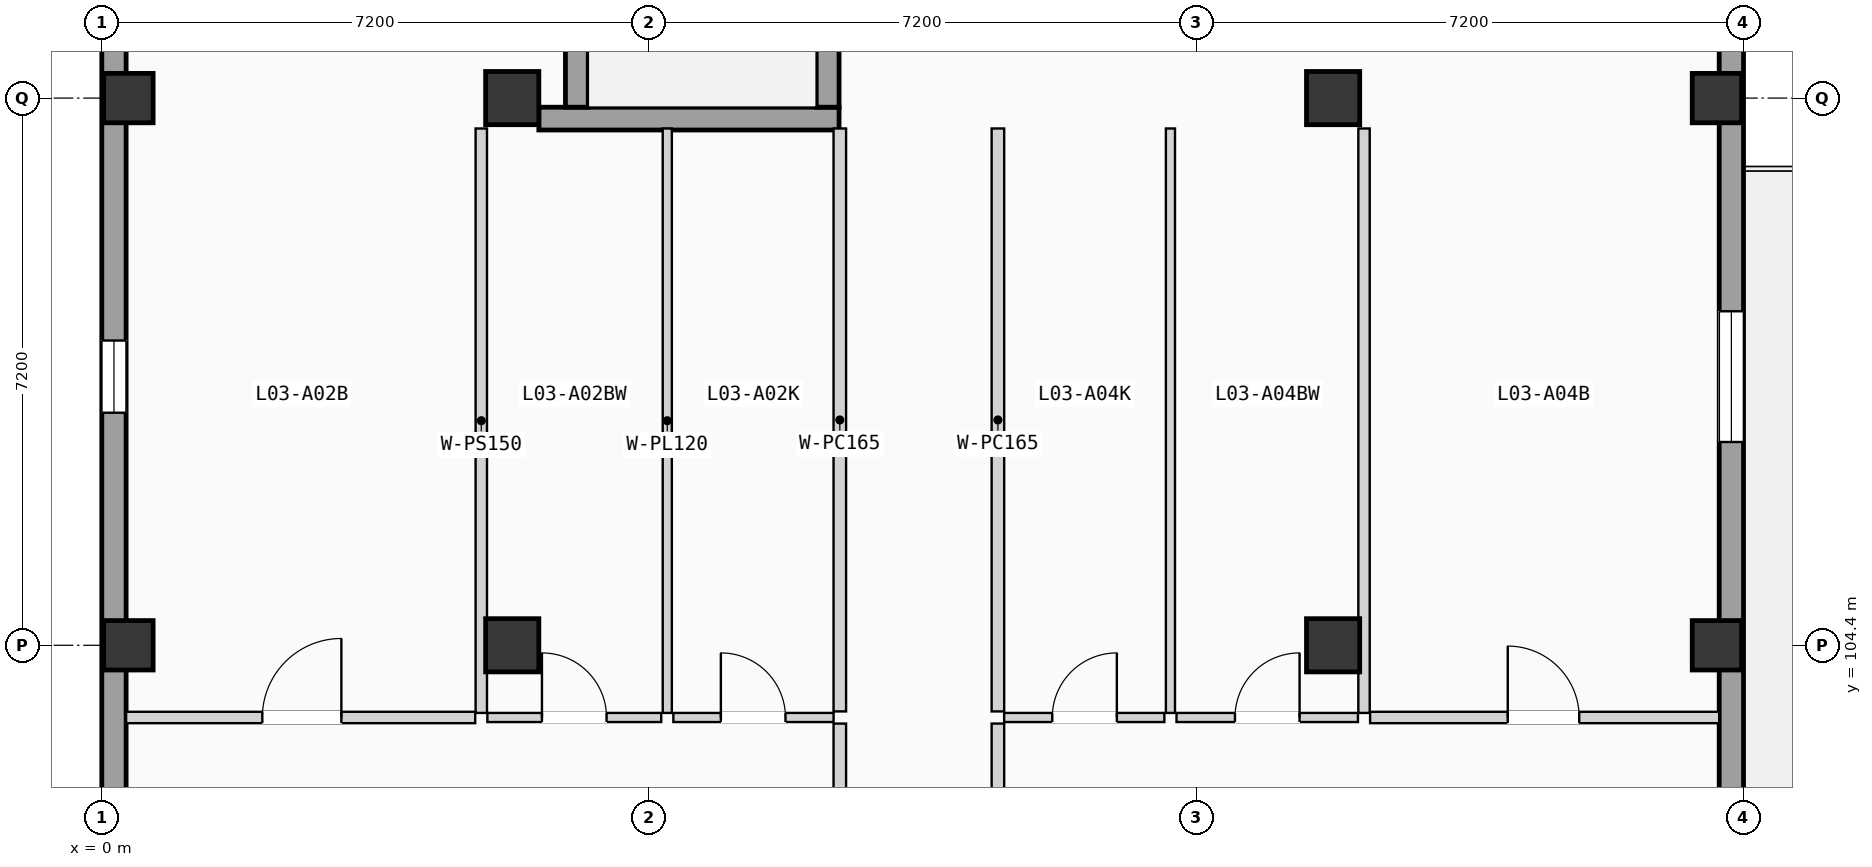
"""IFC4 building model, lengths in metres.
Left out: names, types, materials, properties, quantities, classifications, styles, units other than length and angle.
Written with IfcOpenShell. Run it as: python <this file> out.ifc"""

import sys

from ifc_helpers import new_model, si_unit, direction, frame, frame_2d, origin, origin_2d, place, context, subcontext, project, spatial, rectangle, extrude, element, fill, save


model = new_model("IFC4")
c1 = context("Model", 3, precision=1e-05, world=origin(), true_north=direction((0.0, 1.0)))
c2 = subcontext(c1, "Body", "Model", "MODEL_VIEW")
j1 = project(units=[si_unit("LENGTHUNIT", "METRE"), si_unit("PLANEANGLEUNIT", "RADIAN")], contexts=[c1])
p1 = place(None, origin())
s1 = spatial("IfcSite", under=j1, at=p1, CompositionType="ELEMENT")
p2 = place(p1, origin())
s2 = spatial("IfcBuilding", under=s1, at=p2, CompositionType="ELEMENT")
p3 = place(p2, frame((0.0, 0.0, 12.075)))
s3 = spatial("IfcBuildingStorey", under=s2, at=p3, CompositionType="ELEMENT", Elevation=12.075)
for number, where, z_axis, x_axis in (
    (1, (0.35, 104.4, 0.0), (0.0, 0.0, 1.0), (1.0, 0.0, 0.0)),
    (2, (0.35, 111.6, 0.0), (0.0, 0.0, 1.0), (1.0, 0.0, 0.0)),
):
    element("IfcColumn", number, at=place(p3, frame(where, z_axis=z_axis, x_axis=x_axis)), inside=s3, PredefinedType="COLUMN", context=c2, shape_type="SweptSolid", body=[
        extrude(rectangle(XDim=0.65, YDim=0.65, at=origin_2d()), origin(), (0.0, 0.0, 1.0), 3.15),
    ])
for number, where, z_axis, x_axis in (
    (3, (5.4, 104.4, 0.0), (0.0, 0.0, 1.0), (1.0, 0.0, 0.0)),
    (4, (5.4, 111.6, 0.0), (0.0, 0.0, 1.0), (1.0, 0.0, 0.0)),
    (5, (16.2, 104.4, 0.0), (0.0, 0.0, 1.0), (1.0, 0.0, 0.0)),
    (6, (16.2, 111.6, 0.0), (0.0, 0.0, 1.0), (1.0, 0.0, 0.0)),
):
    element("IfcColumn", number, at=place(p3, frame(where, z_axis=z_axis, x_axis=x_axis)), inside=s3, PredefinedType="COLUMN", context=c2, shape_type="SweptSolid", body=[
        extrude(rectangle(XDim=0.7, YDim=0.7, at=origin_2d()), origin(), (0.0, 0.0, 1.0), 3.15),
    ])
for number, where, z_axis, x_axis in (
    (7, (21.25, 104.4, 0.0), (0.0, 0.0, 1.0), (1.0, 0.0, 0.0)),
    (8, (21.25, 111.6, 0.0), (0.0, 0.0, 1.0), (1.0, 0.0, 0.0)),
):
    element("IfcColumn", number, at=place(p3, frame(where, z_axis=z_axis, x_axis=x_axis)), inside=s3, PredefinedType="COLUMN", context=c2, shape_type="SweptSolid", body=[
        extrude(rectangle(XDim=0.65, YDim=0.65, at=origin_2d()), origin(), (0.0, 0.0, 1.0), 3.15),
    ])
p4 = place(p3, frame((0.16, 68.72, 0.0), z_axis=(0.0, 0.0, 1.0), x_axis=(0.0, 1.0, 0.0)))
e9 = element("IfcWall", 9, at=p4, inside=s3, PredefinedType="SOLIDWALL", context=c2, shape_type="SweptSolid", body=[
    extrude(rectangle(XDim=49.76, YDim=0.32, at=frame_2d((24.88, 0.0))), origin(), (0.0, 0.0, 1.0), 2.89),
])
p5 = place(p4, frame((12.169, 0.0, 0.85)))
e10 = element("IfcOpeningElement", 10, at=p5, cuts=e9, PredefinedType="OPENING", context=c2, shape_type="SweptSolid", body=[
    extrude(rectangle(XDim=0.95, YDim=1.2, at=frame_2d((0.475, 0.6))), frame((0.0, 0.17, 0.0), z_axis=(0.0, -1.0, 0.0), x_axis=(1.0, 0.0, 0.0)), (0.0, 0.0, 1.0), 0.34),
])
p6 = place(p4, frame((8.499, 0.0, 0.9)))
e11 = element("IfcOpeningElement", 11, at=p6, cuts=e9, PredefinedType="OPENING", context=c2, shape_type="SweptSolid", body=[
    extrude(rectangle(XDim=1.6, YDim=1.2, at=frame_2d((0.8, 0.6))), frame((0.0, 0.17, 0.0), z_axis=(0.0, -1.0, 0.0), x_axis=(1.0, 0.0, 0.0)), (0.0, 0.0, 1.0), 0.34),
])
p7 = place(p4, frame((17.747, 0.0, 0.855)))
e12 = element("IfcOpeningElement", 12, at=p7, cuts=e9, PredefinedType="OPENING", context=c2, shape_type="SweptSolid", body=[
    extrude(rectangle(XDim=1.6, YDim=1.35, at=frame_2d((0.8, 0.675))), frame((0.0, 0.17, 0.0), z_axis=(0.0, -1.0, 0.0), x_axis=(1.0, 0.0, 0.0)), (0.0, 0.0, 1.0), 0.34),
])
p8 = place(p4, frame((30.9, 0.0, 0.705)))
e13 = element("IfcOpeningElement", 13, at=p8, cuts=e9, PredefinedType="OPENING", context=c2, shape_type="SweptSolid", body=[
    extrude(rectangle(XDim=1.6, YDim=1.5, at=frame_2d((0.8, 0.75))), frame((0.0, 0.17, 0.0), z_axis=(0.0, -1.0, 0.0), x_axis=(1.0, 0.0, 0.0)), (0.0, 0.0, 1.0), 0.34),
])
p9 = place(p4, frame((23.677, 0.0, 0.555)))
e14 = element("IfcOpeningElement", 14, at=p9, cuts=e9, PredefinedType="OPENING", context=c2, shape_type="SweptSolid", body=[
    extrude(rectangle(XDim=1.6, YDim=1.65, at=frame_2d((0.8, 0.825))), frame((0.0, 0.17, 0.0), z_axis=(0.0, -1.0, 0.0), x_axis=(1.0, 0.0, 0.0)), (0.0, 0.0, 1.0), 0.34),
])
p10 = place(p4, frame((38.74, 0.0, 0.85)))
e15 = element("IfcOpeningElement", 15, at=p10, cuts=e9, PredefinedType="OPENING", context=c2, shape_type="SweptSolid", body=[
    extrude(rectangle(XDim=0.95, YDim=1.2, at=frame_2d((0.475, 0.6))), frame((0.0, 0.17, 0.0), z_axis=(0.0, -1.0, 0.0), x_axis=(1.0, 0.0, 0.0)), (0.0, 0.0, 1.0), 0.34),
])
p11 = place(p3, frame((21.44, 68.72, 0.0), z_axis=(0.0, 0.0, 1.0), x_axis=(0.0, 1.0, 0.0)))
e16 = element("IfcWall", 16, at=p11, inside=s3, PredefinedType="SOLIDWALL", context=c2, shape_type="SweptSolid", body=[
    extrude(rectangle(XDim=49.76, YDim=0.32, at=frame_2d((24.88, 0.0))), origin(), (0.0, 0.0, 1.0), 2.89),
])
p12 = place(p11, frame((10.83, 0.0, 0.0)))
e17 = element("IfcOpeningElement", 17, at=p12, cuts=e16, PredefinedType="OPENING", context=c2, shape_type="SweptSolid", body=[
    extrude(rectangle(XDim=0.95, YDim=2.15, at=frame_2d((0.475, 1.075))), frame((0.0, 0.17, 0.0), z_axis=(0.0, -1.0, 0.0), x_axis=(1.0, 0.0, 0.0)), (0.0, 0.0, 1.0), 0.34),
])
p13 = place(p11, frame((16.598, 0.0, 0.9)))
e18 = element("IfcOpeningElement", 18, at=p13, cuts=e16, PredefinedType="OPENING", context=c2, shape_type="SweptSolid", body=[
    extrude(rectangle(XDim=1.72, YDim=1.2, at=frame_2d((0.86, 0.6))), frame((0.0, 0.17, 0.0), z_axis=(0.0, -1.0, 0.0), x_axis=(1.0, 0.0, 0.0)), (0.0, 0.0, 1.0), 0.34),
])
p14 = place(p11, frame((32.365, 0.0, 0.0)))
e19 = element("IfcOpeningElement", 19, at=p14, cuts=e16, PredefinedType="OPENING", context=c2, shape_type="SweptSolid", body=[
    extrude(rectangle(XDim=1.08, YDim=2.18, at=frame_2d((0.54, 1.09))), frame((0.0, 0.17, 0.0), z_axis=(0.0, -1.0, 0.0), x_axis=(1.0, 0.0, 0.0)), (0.0, 0.0, 1.0), 0.34),
])
p15 = place(p11, frame((23.617, 0.0, 0.855)))
e20 = element("IfcOpeningElement", 20, at=p15, cuts=e16, PredefinedType="OPENING", context=c2, shape_type="SweptSolid", body=[
    extrude(rectangle(XDim=1.72, YDim=1.35, at=frame_2d((0.86, 0.675))), frame((0.0, 0.17, 0.0), z_axis=(0.0, -1.0, 0.0), x_axis=(1.0, 0.0, 0.0)), (0.0, 0.0, 1.0), 0.34),
])
p16 = place(p11, frame((38.355, 0.0, 0.705)))
e21 = element("IfcOpeningElement", 21, at=p16, cuts=e16, PredefinedType="OPENING", context=c2, shape_type="SweptSolid", body=[
    extrude(rectangle(XDim=1.72, YDim=1.5, at=frame_2d((0.86, 0.75))), frame((0.0, 0.17, 0.0), z_axis=(0.0, -1.0, 0.0), x_axis=(1.0, 0.0, 0.0)), (0.0, 0.0, 1.0), 0.34),
])
p17 = place(p3, frame((5.75, 111.33, 0.0), z_axis=(0.0, 0.0, 1.0), x_axis=(1.0, 0.0, 0.0)))
e22 = element("IfcWall", 22, at=p17, inside=s3, PredefinedType="SHEAR", context=c2, shape_type="SweptSolid", body=[
    extrude(rectangle(XDim=3.95, YDim=0.3, at=frame_2d((1.975, 0.0))), origin(), (0.0, 0.0, 1.0), 2.89),
])
p18 = place(p3, frame((6.25, 111.48, 0.0), z_axis=(0.0, 0.0, 1.0), x_axis=(0.0, 1.0, 0.0)))
e23 = element("IfcWall", 23, at=p18, inside=s3, PredefinedType="SHEAR", context=c2, shape_type="SweptSolid", body=[
    extrude(rectangle(XDim=7.0, YDim=0.3, at=frame_2d((3.5, 0.0))), origin(), (0.0, 0.0, 1.0), 2.89),
])
p19 = place(p3, frame((9.55, 111.48, 0.0), z_axis=(0.0, 0.0, 1.0), x_axis=(0.0, 1.0, 0.0)))
e24 = element("IfcWall", 24, at=p19, inside=s3, PredefinedType="SHEAR", context=c2, shape_type="SweptSolid", body=[
    extrude(rectangle(XDim=7.0, YDim=0.3, at=frame_2d((3.5, 0.0))), origin(), (0.0, 0.0, 1.0), 2.89),
])
p20 = place(p19, frame((5.625, 0.0, 0.0)))
e25 = element("IfcOpeningElement", 25, at=p20, cuts=e24, PredefinedType="OPENING", context=c2, shape_type="SweptSolid", body=[
    extrude(rectangle(XDim=1.15, YDim=2.12, at=frame_2d((0.575, 1.06))), frame((0.0, 0.16, 0.0), z_axis=(0.0, -1.0, 0.0), x_axis=(1.0, 0.0, 0.0)), (0.0, 0.0, 1.0), 0.32),
])
p21 = place(p3, frame((9.71, 96.284, 0.0), z_axis=(0.0, 0.0, 1.0), x_axis=(0.0, 1.0, 0.0)))
e26 = element("IfcWall", 26, at=p21, inside=s3, PredefinedType="PARTITIONING", context=c2, shape_type="SweptSolid", body=[
    extrude(rectangle(XDim=7.086, YDim=0.165, at=frame_2d((3.543, 0.0))), origin(), (0.0, 0.0, 1.0), 2.87),
])
p22 = place(p21, frame((3.053, 0.0, 0.0)))
e27 = element("IfcOpeningElement", 27, at=p22, cuts=e26, PredefinedType="OPENING", context=c2, shape_type="SweptSolid", body=[
    extrude(rectangle(XDim=0.98, YDim=2.08, at=frame_2d((0.49, 1.04))), frame((0.0, 0.093, 0.0), z_axis=(0.0, -1.0, 0.0), x_axis=(1.0, 0.0, 0.0)), (0.0, 0.0, 1.0), 0.185),
])
p23 = place(p3, frame((9.71, 103.53, 0.0), z_axis=(0.0, 0.0, 1.0), x_axis=(0.0, 1.0, 0.0)))
e28 = element("IfcWall", 28, at=p23, inside=s3, PredefinedType="PARTITIONING", context=c2, shape_type="SweptSolid", body=[
    extrude(rectangle(XDim=7.67, YDim=0.165, at=frame_2d((3.835, 0.0))), origin(), (0.0, 0.0, 1.0), 2.87),
])
p24 = place(p3, frame((11.79, 96.284, 0.0), z_axis=(0.0, 0.0, 1.0), x_axis=(0.0, 1.0, 0.0)))
e29 = element("IfcWall", 29, at=p24, inside=s3, PredefinedType="PARTITIONING", context=c2, shape_type="SweptSolid", body=[
    extrude(rectangle(XDim=7.086, YDim=0.165, at=frame_2d((3.543, 0.0))), origin(), (0.0, 0.0, 1.0), 2.87),
])
p25 = place(p24, frame((3.053, 0.0, 0.0)))
e30 = element("IfcOpeningElement", 30, at=p25, cuts=e29, PredefinedType="OPENING", context=c2, shape_type="SweptSolid", body=[
    extrude(rectangle(XDim=0.98, YDim=2.08, at=frame_2d((0.49, 1.04))), frame((0.0, 0.093, 0.0), z_axis=(0.0, -1.0, 0.0), x_axis=(1.0, 0.0, 0.0)), (0.0, 0.0, 1.0), 0.185),
])
p26 = place(p3, frame((11.79, 103.53, 0.0), z_axis=(0.0, 0.0, 1.0), x_axis=(0.0, 1.0, 0.0)))
e31 = element("IfcWall", 31, at=p26, inside=s3, PredefinedType="PARTITIONING", context=c2, shape_type="SweptSolid", body=[
    extrude(rectangle(XDim=7.67, YDim=0.165, at=frame_2d((3.835, 0.0))), origin(), (0.0, 0.0, 1.0), 2.87),
])
p27 = place(p3, frame((7.52, 103.45, 0.0), z_axis=(0.0, 0.0, 1.0), x_axis=(1.0, 0.0, 0.0)))
e32 = element("IfcWall", 32, at=p27, inside=s3, PredefinedType="PARTITIONING", context=c2, shape_type="SweptSolid", body=[
    extrude(rectangle(XDim=2.108, YDim=0.12, at=frame_2d((1.054, 0.0))), origin(), (0.0, 0.0, 1.0), 2.87),
])
p28 = place(p27, frame((0.625, 0.0, 0.0)))
e33 = element("IfcOpeningElement", 33, at=p28, cuts=e32, PredefinedType="OPENING", context=c2, shape_type="SweptSolid", body=[
    extrude(rectangle(XDim=0.85, YDim=2.01, at=frame_2d((0.425, 1.005))), frame((0.0, 0.07, 0.0), z_axis=(0.0, -1.0, 0.0), x_axis=(1.0, 0.0, 0.0)), (0.0, 0.0, 1.0), 0.14),
])
p29 = place(p3, frame((0.32, 103.45, 0.0), z_axis=(0.0, 0.0, 1.0), x_axis=(1.0, 0.0, 0.0)))
e34 = element("IfcWall", 34, at=p29, inside=s3, PredefinedType="PARTITIONING", context=c2, shape_type="SweptSolid", body=[
    extrude(rectangle(XDim=4.593, YDim=0.15, at=frame_2d((2.296, 0.0))), origin(), (0.0, 0.0, 1.0), 2.87),
])
p30 = place(p29, frame((1.792, 0.0, 0.0)))
e35 = element("IfcOpeningElement", 35, at=p30, cuts=e34, PredefinedType="OPENING", context=c2, shape_type="SweptSolid", body=[
    extrude(rectangle(XDim=1.04, YDim=2.08, at=frame_2d((0.52, 1.04))), frame((0.0, 0.085, 0.0), z_axis=(0.0, -1.0, 0.0), x_axis=(1.0, 0.0, 0.0)), (0.0, 0.0, 1.0), 0.17),
])
p31 = place(p3, frame((5.073, 103.45, 0.0), z_axis=(0.0, 0.0, 1.0), x_axis=(1.0, 0.0, 0.0)))
e36 = element("IfcWall", 36, at=p31, inside=s3, PredefinedType="PARTITIONING", context=c2, shape_type="SweptSolid", body=[
    extrude(rectangle(XDim=2.287, YDim=0.12, at=frame_2d((1.144, 0.0))), origin(), (0.0, 0.0, 1.0), 2.87),
])
p32 = place(p31, frame((0.718, 0.0, 0.0)))
e37 = element("IfcOpeningElement", 37, at=p32, cuts=e36, PredefinedType="OPENING", context=c2, shape_type="SweptSolid", body=[
    extrude(rectangle(XDim=0.85, YDim=2.01, at=frame_2d((0.425, 1.005))), frame((0.0, 0.07, 0.0), z_axis=(0.0, -1.0, 0.0), x_axis=(1.0, 0.0, 0.0)), (0.0, 0.0, 1.0), 0.14),
])
p33 = place(p3, frame((7.44, 103.51, 0.0), z_axis=(0.0, 0.0, 1.0), x_axis=(0.0, 1.0, 0.0)))
e38 = element("IfcWall", 38, at=p33, inside=s3, PredefinedType="PARTITIONING", context=c2, shape_type="SweptSolid", body=[
    extrude(rectangle(XDim=7.69, YDim=0.12, at=frame_2d((3.845, 0.0))), origin(), (0.0, 0.0, 1.0), 2.87),
])
p34 = place(p3, frame((4.993, 103.51, 0.0), z_axis=(0.0, 0.0, 1.0), x_axis=(0.0, 1.0, 0.0)))
e39 = element("IfcWall", 39, at=p34, inside=s3, PredefinedType="PARTITIONING", context=c2, shape_type="SweptSolid", body=[
    extrude(rectangle(XDim=7.69, YDim=0.15, at=frame_2d((3.845, 0.0))), origin(), (0.0, 0.0, 1.0), 2.87),
])
p35 = place(p3, frame((11.872, 103.45, 0.0), z_axis=(0.0, 0.0, 1.0), x_axis=(1.0, 0.0, 0.0)))
e40 = element("IfcWall", 40, at=p35, inside=s3, PredefinedType="PARTITIONING", context=c2, shape_type="SweptSolid", body=[
    extrude(rectangle(XDim=2.108, YDim=0.12, at=frame_2d((1.054, 0.0))), origin(), (0.0, 0.0, 1.0), 2.87),
])
p36 = place(p35, frame((0.633, 0.0, 0.0)))
e41 = element("IfcOpeningElement", 41, at=p36, cuts=e40, PredefinedType="OPENING", context=c2, shape_type="SweptSolid", body=[
    extrude(rectangle(XDim=0.85, YDim=2.01, at=frame_2d((0.425, 1.005))), frame((0.0, 0.07, 0.0), z_axis=(0.0, -1.0, 0.0), x_axis=(1.0, 0.0, 0.0)), (0.0, 0.0, 1.0), 0.14),
])
p37 = place(p3, frame((16.687, 103.45, 0.0), z_axis=(0.0, 0.0, 1.0), x_axis=(1.0, 0.0, 0.0)))
e42 = element("IfcWall", 42, at=p37, inside=s3, PredefinedType="PARTITIONING", context=c2, shape_type="SweptSolid", body=[
    extrude(rectangle(XDim=4.593, YDim=0.15, at=frame_2d((2.296, 0.0))), origin(), (0.0, 0.0, 1.0), 2.87),
])
p38 = place(p37, frame((1.811, 0.0, 0.0)))
e43 = element("IfcOpeningElement", 43, at=p38, cuts=e42, PredefinedType="OPENING", context=c2, shape_type="SweptSolid", body=[
    extrude(rectangle(XDim=0.94, YDim=2.06, at=frame_2d((0.47, 1.03))), frame((0.0, 0.085, 0.0), z_axis=(0.0, -1.0, 0.0), x_axis=(1.0, 0.0, 0.0)), (0.0, 0.0, 1.0), 0.17),
])
p39 = place(p3, frame((14.14, 103.45, 0.0), z_axis=(0.0, 0.0, 1.0), x_axis=(1.0, 0.0, 0.0)))
e44 = element("IfcWall", 44, at=p39, inside=s3, PredefinedType="PARTITIONING", context=c2, shape_type="SweptSolid", body=[
    extrude(rectangle(XDim=2.387, YDim=0.12, at=frame_2d((1.194, 0.0))), origin(), (0.0, 0.0, 1.0), 2.87),
])
p40 = place(p39, frame((0.769, 0.0, 0.0)))
e45 = element("IfcOpeningElement", 45, at=p40, cuts=e44, PredefinedType="OPENING", context=c2, shape_type="SweptSolid", body=[
    extrude(rectangle(XDim=0.85, YDim=2.01, at=frame_2d((0.425, 1.005))), frame((0.0, 0.07, 0.0), z_axis=(0.0, -1.0, 0.0), x_axis=(1.0, 0.0, 0.0)), (0.0, 0.0, 1.0), 0.14),
])
p41 = place(p3, frame((14.06, 103.51, 0.0), z_axis=(0.0, 0.0, 1.0), x_axis=(0.0, 1.0, 0.0)))
e46 = element("IfcWall", 46, at=p41, inside=s3, PredefinedType="PARTITIONING", context=c2, shape_type="SweptSolid", body=[
    extrude(rectangle(XDim=7.69, YDim=0.12, at=frame_2d((3.845, 0.0))), origin(), (0.0, 0.0, 1.0), 2.87),
])
p42 = place(p3, frame((16.607, 103.51, 0.0), z_axis=(0.0, 0.0, 1.0), x_axis=(0.0, 1.0, 0.0)))
e47 = element("IfcWall", 47, at=p42, inside=s3, PredefinedType="PARTITIONING", context=c2, shape_type="SweptSolid", body=[
    extrude(rectangle(XDim=7.69, YDim=0.15, at=frame_2d((3.845, 0.0))), origin(), (0.0, 0.0, 1.0), 2.87),
])
p43 = place(p10, origin())
e48 = element("IfcWindow", 48, at=p43, inside=s3, PartitioningType="SINGLE_PANEL", PredefinedType="WINDOW", context=c2, shape_type="SweptSolid", body=[
    extrude(rectangle(XDim=0.95, YDim=1.2, at=frame_2d((0.475, 0.6))), frame((0.0, 0.03, 0.0), z_axis=(0.0, -1.0, 0.0), x_axis=(1.0, 0.0, 0.0)), (0.0, 0.0, 1.0), 0.06),
])
fill(e15, e48)
p44 = place(p16, origin())
e49 = element("IfcWindow", 49, at=p44, inside=s3, PartitioningType="DOUBLE_PANEL_VERTICAL", PredefinedType="WINDOW", context=c2, shape_type="SweptSolid", body=[
    extrude(rectangle(XDim=1.72, YDim=1.5, at=frame_2d((0.86, 0.75))), frame((0.0, 0.03, 0.0), z_axis=(0.0, -1.0, 0.0), x_axis=(1.0, 0.0, 0.0)), (0.0, 0.0, 1.0), 0.06),
])
fill(e21, e49)
p45 = place(p28, origin())
e50 = element("IfcDoor", 50, at=p45, inside=s3, OperationType="SINGLE_SWING_LEFT", PredefinedType="DOOR", context=c2, shape_type="SweptSolid", body=[
    extrude(rectangle(XDim=0.85, YDim=2.01, at=frame_2d((0.425, 1.005))), frame((0.0, 0.025, 0.0), z_axis=(0.0, -1.0, 0.0), x_axis=(1.0, 0.0, 0.0)), (0.0, 0.0, 1.0), 0.05),
])
fill(e33, e50)
p46 = place(p30, origin())
e51 = element("IfcDoor", 51, at=p46, inside=s3, OperationType="SINGLE_SWING_RIGHT", PredefinedType="DOOR", context=c2, shape_type="SweptSolid", body=[
    extrude(rectangle(XDim=1.04, YDim=2.08, at=frame_2d((0.52, 1.04))), frame((0.0, 0.025, 0.0), z_axis=(0.0, -1.0, 0.0), x_axis=(1.0, 0.0, 0.0)), (0.0, 0.0, 1.0), 0.05),
])
fill(e35, e51)
p47 = place(p32, origin())
e52 = element("IfcDoor", 52, at=p47, inside=s3, OperationType="SINGLE_SWING_LEFT", PredefinedType="DOOR", context=c2, shape_type="SweptSolid", body=[
    extrude(rectangle(XDim=0.85, YDim=2.01, at=frame_2d((0.425, 1.005))), frame((0.0, 0.025, 0.0), z_axis=(0.0, -1.0, 0.0), x_axis=(1.0, 0.0, 0.0)), (0.0, 0.0, 1.0), 0.05),
])
fill(e37, e52)
p48 = place(p36, origin())
e53 = element("IfcDoor", 53, at=p48, inside=s3, OperationType="SINGLE_SWING_RIGHT", PredefinedType="DOOR", context=c2, shape_type="SweptSolid", body=[
    extrude(rectangle(XDim=0.85, YDim=2.01, at=frame_2d((0.425, 1.005))), frame((0.0, 0.025, 0.0), z_axis=(0.0, -1.0, 0.0), x_axis=(1.0, 0.0, 0.0)), (0.0, 0.0, 1.0), 0.05),
])
fill(e41, e53)
p49 = place(p38, origin())
e54 = element("IfcDoor", 54, at=p49, inside=s3, OperationType="SINGLE_SWING_LEFT", PredefinedType="DOOR", context=c2, shape_type="SweptSolid", body=[
    extrude(rectangle(XDim=0.94, YDim=2.06, at=frame_2d((0.47, 1.03))), frame((0.0, 0.025, 0.0), z_axis=(0.0, -1.0, 0.0), x_axis=(1.0, 0.0, 0.0)), (0.0, 0.0, 1.0), 0.05),
])
fill(e43, e54)
p50 = place(p40, origin())
e55 = element("IfcDoor", 55, at=p50, inside=s3, OperationType="SINGLE_SWING_RIGHT", PredefinedType="DOOR", context=c2, shape_type="SweptSolid", body=[
    extrude(rectangle(XDim=0.85, YDim=2.01, at=frame_2d((0.425, 1.005))), frame((0.0, 0.025, 0.0), z_axis=(0.0, -1.0, 0.0), x_axis=(1.0, 0.0, 0.0)), (0.0, 0.0, 1.0), 0.05),
])
fill(e45, e55)
save(model, sys.argv[1])
